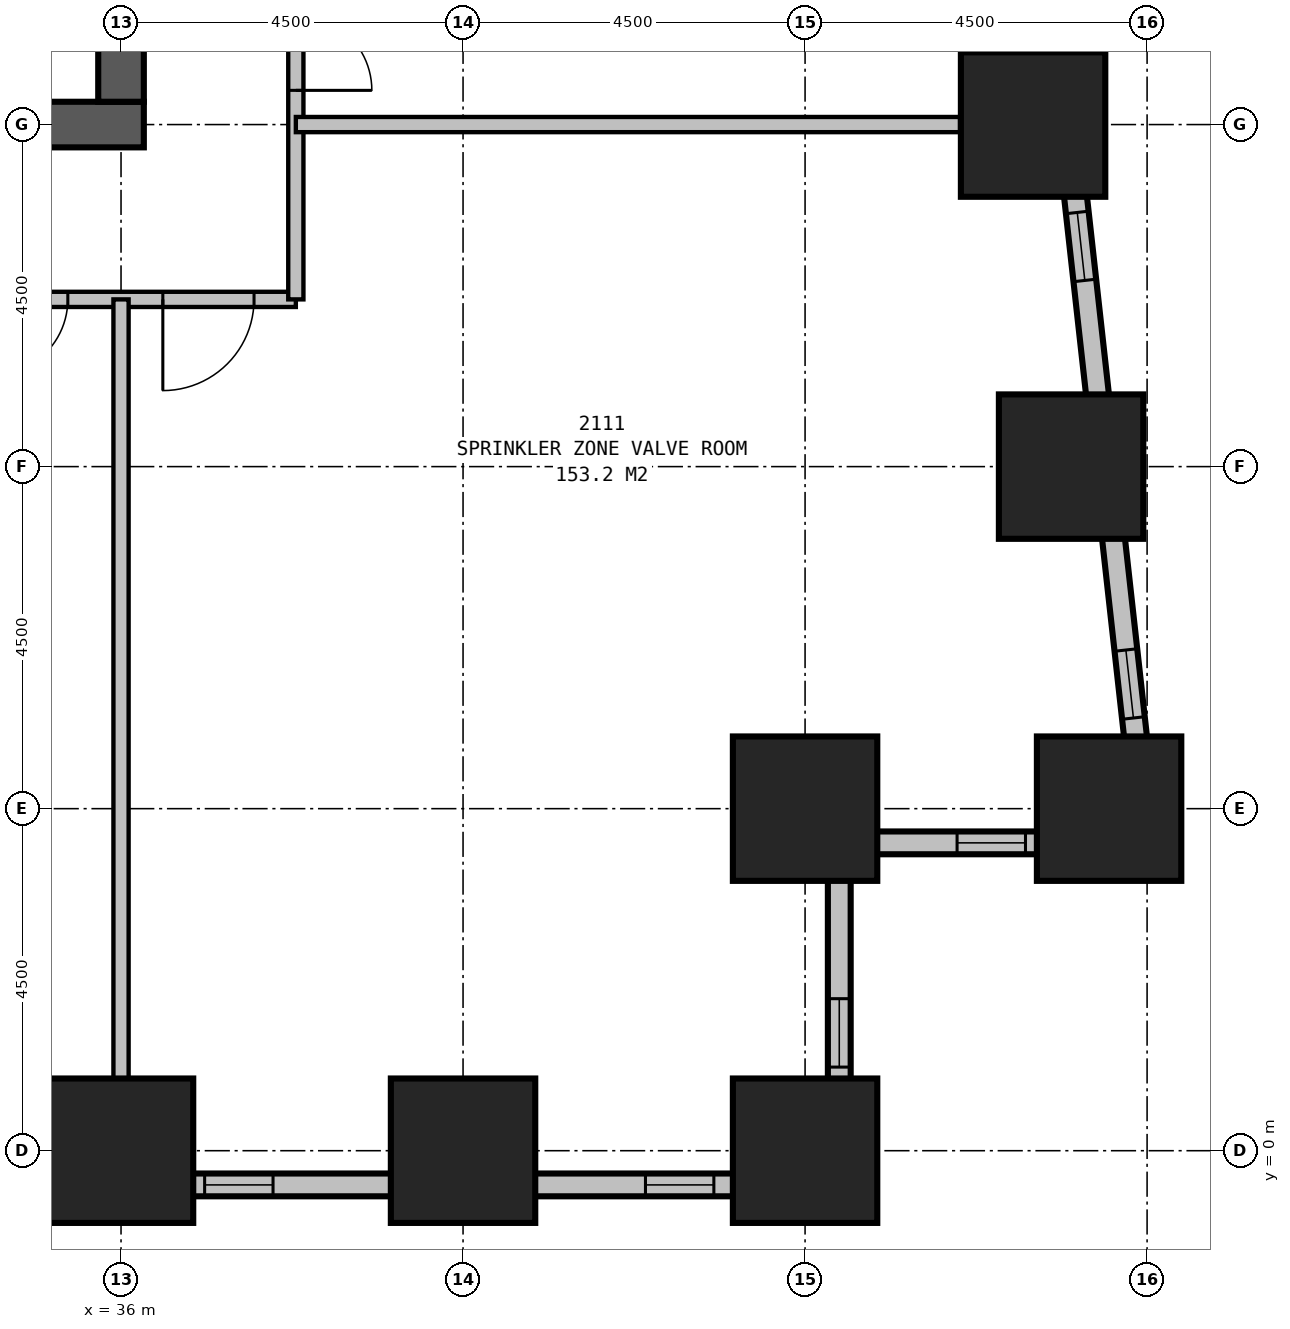
"""IFC4 building model, lengths in metres.
Left out: names, types, materials, properties, quantities, classifications, styles, units other than length and angle.
Written with IfcOpenShell. Run it as: python <this file> out.ifc"""

import sys

from ifc_helpers import new_model, si_unit, direction, frame, frame_2d, origin, origin_2d, place, context, subcontext, project, spatial, rectangle, extrude, element, fill, save


model = new_model("IFC4")
c1 = context("Model", 3, precision=1e-05, world=origin(), true_north=direction((0.0, 1.0)))
c2 = subcontext(c1, "Body", "Model", "MODEL_VIEW")
j1 = project(units=[si_unit("LENGTHUNIT", "METRE"), si_unit("PLANEANGLEUNIT", "RADIAN")], contexts=[c1])
p1 = place(None, origin())
s1 = spatial("IfcSite", under=j1, at=p1, CompositionType="ELEMENT")
p2 = place(p1, origin())
s2 = spatial("IfcBuilding", under=s1, at=p2, CompositionType="ELEMENT")
p3 = place(p2, frame((0.0, 0.0, 85.7)))
s3 = spatial("IfcBuildingStorey", under=s2, at=p3, CompositionType="ELEMENT", Elevation=85.7)
for number, where, z_axis, x_axis in (
    (1, (36.0, 0.0, 0.0), (0.0, 0.0, 1.0), (1.0, 0.0, 0.0)),
    (2, (40.5, 0.0, 0.0), (0.0, 0.0, 1.0), (1.0, 0.0, 0.0)),
    (3, (45.0, 0.0, 0.0), (0.0, 0.0, 1.0), (1.0, 0.0, 0.0)),
    (4, (45.0, 4.5, 0.0), (0.0, 0.0, 1.0), (1.0, 0.0, 0.0)),
    (5, (49.0, 4.5, 0.0), (0.0, 0.0, 1.0), (1.0, 0.0, 0.0)),
    (6, (48.5, 9.0, 0.0), (0.0, 0.0, 1.0), (1.0, 0.0, 0.0)),
    (7, (48.0, 13.5, 0.0), (0.0, 0.0, 1.0), (1.0, 0.0, 0.0)),
):
    element("IfcColumn", number, at=place(p3, frame(where, z_axis=z_axis, x_axis=x_axis)), inside=s3, PredefinedType="COLUMN", context=c2, shape_type="SweptSolid", body=[
        extrude(rectangle(XDim=1.9, YDim=1.9, at=origin_2d()), origin(), (0.0, 0.0, 1.0), 4.2),
    ])
p4 = place(p3, frame((13.2, 13.5, 0.0), z_axis=(0.0, 0.0, 1.0), x_axis=(1.0, 0.0, 0.0)))
e8 = element("IfcWall", 8, at=p4, inside=s3, PredefinedType="SHEAR", context=c2, shape_type="SweptSolid", body=[
    extrude(rectangle(XDim=23.1, YDim=0.6, at=frame_2d((11.55, 0.0))), origin(), (0.0, 0.0, 1.0), 4.2),
])
p5 = place(p3, frame((36.0, 13.8, 0.0), z_axis=(0.0, 0.0, 1.0), x_axis=(0.0, 1.0, 0.0)))
e9 = element("IfcWall", 9, at=p5, inside=s3, PredefinedType="SHEAR", context=c2, shape_type="SweptSolid", body=[
    extrude(rectangle(XDim=2.7, YDim=0.6, at=frame_2d((1.35, 0.0))), origin(), (0.0, 0.0, 1.0), 4.2),
])
p6 = place(p3, frame((3.9, -0.45, 0.0), z_axis=(0.0, 0.0, 1.0), x_axis=(1.0, 0.0, 0.0)))
e10 = element("IfcWall", 10, at=p6, inside=s3, PredefinedType="STANDARD", context=c2, shape_type="SweptSolid", body=[
    extrude(rectangle(XDim=41.7, YDim=0.3, at=frame_2d((20.85, 0.0))), origin(), (0.0, 0.0, 1.0), 2.85),
])
p7 = place(p6, frame((3.0, 0.0, 0.5)))
e11 = element("IfcOpeningElement", 11, at=p7, cuts=e10, PredefinedType="OPENING", context=c2, shape_type="SweptSolid", body=[
    extrude(rectangle(XDim=0.9, YDim=1.2, at=frame_2d((0.45, 0.6))), frame((0.0, 0.16, 0.0), z_axis=(0.0, -1.0, 0.0), x_axis=(1.0, 0.0, 0.0)), (0.0, 0.0, 1.0), 0.32),
])
p8 = place(p6, frame((6.2, 0.0, 0.5)))
e12 = element("IfcOpeningElement", 12, at=p8, cuts=e10, PredefinedType="OPENING", context=c2, shape_type="SweptSolid", body=[
    extrude(rectangle(XDim=0.9, YDim=1.2, at=frame_2d((0.45, 0.6))), frame((0.0, 0.16, 0.0), z_axis=(0.0, -1.0, 0.0), x_axis=(1.0, 0.0, 0.0)), (0.0, 0.0, 1.0), 0.32),
])
p9 = place(p6, frame((12.0, 0.0, 0.5)))
e13 = element("IfcOpeningElement", 13, at=p9, cuts=e10, PredefinedType="OPENING", context=c2, shape_type="SweptSolid", body=[
    extrude(rectangle(XDim=0.9, YDim=1.2, at=frame_2d((0.45, 0.6))), frame((0.0, 0.16, 0.0), z_axis=(0.0, -1.0, 0.0), x_axis=(1.0, 0.0, 0.0)), (0.0, 0.0, 1.0), 0.32),
])
p10 = place(p6, frame((15.2, 0.0, 0.5)))
e14 = element("IfcOpeningElement", 14, at=p10, cuts=e10, PredefinedType="OPENING", context=c2, shape_type="SweptSolid", body=[
    extrude(rectangle(XDim=0.9, YDim=1.2, at=frame_2d((0.45, 0.6))), frame((0.0, 0.16, 0.0), z_axis=(0.0, -1.0, 0.0), x_axis=(1.0, 0.0, 0.0)), (0.0, 0.0, 1.0), 0.32),
])
p11 = place(p6, frame((21.0, 0.0, 0.5)))
e15 = element("IfcOpeningElement", 15, at=p11, cuts=e10, PredefinedType="OPENING", context=c2, shape_type="SweptSolid", body=[
    extrude(rectangle(XDim=0.9, YDim=1.2, at=frame_2d((0.45, 0.6))), frame((0.0, 0.16, 0.0), z_axis=(0.0, -1.0, 0.0), x_axis=(1.0, 0.0, 0.0)), (0.0, 0.0, 1.0), 0.32),
])
p12 = place(p6, frame((24.2, 0.0, 0.5)))
e16 = element("IfcOpeningElement", 16, at=p12, cuts=e10, PredefinedType="OPENING", context=c2, shape_type="SweptSolid", body=[
    extrude(rectangle(XDim=0.9, YDim=1.2, at=frame_2d((0.45, 0.6))), frame((0.0, 0.16, 0.0), z_axis=(0.0, -1.0, 0.0), x_axis=(1.0, 0.0, 0.0)), (0.0, 0.0, 1.0), 0.32),
])
p13 = place(p6, frame((30.0, 0.0, 0.5)))
e17 = element("IfcOpeningElement", 17, at=p13, cuts=e10, PredefinedType="OPENING", context=c2, shape_type="SweptSolid", body=[
    extrude(rectangle(XDim=0.9, YDim=1.2, at=frame_2d((0.45, 0.6))), frame((0.0, 0.16, 0.0), z_axis=(0.0, -1.0, 0.0), x_axis=(1.0, 0.0, 0.0)), (0.0, 0.0, 1.0), 0.32),
])
p14 = place(p6, frame((33.2, 0.0, 0.5)))
e18 = element("IfcOpeningElement", 18, at=p14, cuts=e10, PredefinedType="OPENING", context=c2, shape_type="SweptSolid", body=[
    extrude(rectangle(XDim=0.9, YDim=1.2, at=frame_2d((0.45, 0.6))), frame((0.0, 0.16, 0.0), z_axis=(0.0, -1.0, 0.0), x_axis=(1.0, 0.0, 0.0)), (0.0, 0.0, 1.0), 0.32),
])
p15 = place(p6, frame((39.0, 0.0, 0.5)))
e19 = element("IfcOpeningElement", 19, at=p15, cuts=e10, PredefinedType="OPENING", context=c2, shape_type="SweptSolid", body=[
    extrude(rectangle(XDim=0.9, YDim=1.2, at=frame_2d((0.45, 0.6))), frame((0.0, 0.16, 0.0), z_axis=(0.0, -1.0, 0.0), x_axis=(1.0, 0.0, 0.0)), (0.0, 0.0, 1.0), 0.32),
])
p16 = place(p3, frame((45.45, -0.6, 0.0), z_axis=(0.0, 0.0, 1.0), x_axis=(0.0, 1.0, 0.0)))
e20 = element("IfcWall", 20, at=p16, inside=s3, PredefinedType="STANDARD", context=c2, shape_type="SweptSolid", body=[
    extrude(rectangle(XDim=4.8, YDim=0.3, at=frame_2d((2.4, 0.0))), origin(), (0.0, 0.0, 1.0), 2.85),
])
p17 = place(p16, frame((1.7, 0.0, 0.5)))
e21 = element("IfcOpeningElement", 21, at=p17, cuts=e20, PredefinedType="OPENING", context=c2, shape_type="SweptSolid", body=[
    extrude(rectangle(XDim=0.9, YDim=1.2, at=frame_2d((0.45, 0.6))), frame((0.0, 0.16, 0.0), z_axis=(0.0, -1.0, 0.0), x_axis=(1.0, 0.0, 0.0)), (0.0, 0.0, 1.0), 0.32),
])
p18 = place(p3, frame((45.3, 4.05, 0.0), z_axis=(0.0, 0.0, 1.0), x_axis=(1.0, 0.0, 0.0)))
e22 = element("IfcWall", 22, at=p18, inside=s3, PredefinedType="STANDARD", context=c2, shape_type="SweptSolid", body=[
    extrude(rectangle(XDim=4.353, YDim=0.3, at=frame_2d((2.176, 0.0))), origin(), (0.0, 0.0, 1.0), 2.85),
])
p19 = place(p18, frame((1.7, 0.0, 0.3)))
e23 = element("IfcOpeningElement", 23, at=p19, cuts=e22, PredefinedType="OPENING", context=c2, shape_type="SweptSolid", body=[
    extrude(rectangle(XDim=0.9, YDim=1.2, at=frame_2d((0.45, 0.6))), frame((0.0, 0.16, 0.0), z_axis=(0.0, -1.0, 0.0), x_axis=(1.0, 0.0, 0.0)), (0.0, 0.0, 1.0), 0.32),
])
p20 = place(p3, frame((49.519, 3.901, 0.0), z_axis=(0.0, 0.0, 1.0), x_axis=(-0.110429082637, 0.993884006164, 0.0)))
e24 = element("IfcWall", 24, at=p20, inside=s3, PredefinedType="STANDARD", context=c2, shape_type="SweptSolid", body=[
    extrude(rectangle(XDim=32.899, YDim=0.3, at=frame_2d((16.45, 0.0))), origin(), (0.0, 0.0, 1.0), 2.85),
])
p21 = place(p20, frame((1.803, 0.0, 0.5)))
e25 = element("IfcOpeningElement", 25, at=p21, cuts=e24, PredefinedType="OPENING", context=c2, shape_type="SweptSolid", body=[
    extrude(rectangle(XDim=0.9, YDim=1.2, at=frame_2d((0.45, 0.6))), frame((0.0, 0.16, 0.0), z_axis=(0.0, -1.0, 0.0), x_axis=(1.0, 0.0, 0.0)), (0.0, 0.0, 1.0), 0.32),
])
p22 = place(p20, frame((7.595, 0.0, 0.5)))
e26 = element("IfcOpeningElement", 26, at=p22, cuts=e24, PredefinedType="OPENING", context=c2, shape_type="SweptSolid", body=[
    extrude(rectangle(XDim=0.9, YDim=1.2, at=frame_2d((0.45, 0.6))), frame((0.0, 0.16, 0.0), z_axis=(0.0, -1.0, 0.0), x_axis=(1.0, 0.0, 0.0)), (0.0, 0.0, 1.0), 0.32),
])
p23 = place(p20, frame((10.858, 0.0, 0.5)))
e27 = element("IfcOpeningElement", 27, at=p23, cuts=e24, PredefinedType="OPENING", context=c2, shape_type="SweptSolid", body=[
    extrude(rectangle(XDim=0.9, YDim=1.2, at=frame_2d((0.45, 0.6))), frame((0.0, 0.16, 0.0), z_axis=(0.0, -1.0, 0.0), x_axis=(1.0, 0.0, 0.0)), (0.0, 0.0, 1.0), 0.32),
])
p24 = place(p20, frame((16.65, 0.0, 0.5)))
e28 = element("IfcOpeningElement", 28, at=p24, cuts=e24, PredefinedType="OPENING", context=c2, shape_type="SweptSolid", body=[
    extrude(rectangle(XDim=0.9, YDim=1.2, at=frame_2d((0.45, 0.6))), frame((0.0, 0.16, 0.0), z_axis=(0.0, -1.0, 0.0), x_axis=(1.0, 0.0, 0.0)), (0.0, 0.0, 1.0), 0.32),
])
p25 = place(p20, frame((19.914, 0.0, 0.5)))
e29 = element("IfcOpeningElement", 29, at=p25, cuts=e24, PredefinedType="OPENING", context=c2, shape_type="SweptSolid", body=[
    extrude(rectangle(XDim=0.9, YDim=1.2, at=frame_2d((0.45, 0.6))), frame((0.0, 0.16, 0.0), z_axis=(0.0, -1.0, 0.0), x_axis=(1.0, 0.0, 0.0)), (0.0, 0.0, 1.0), 0.32),
])
p26 = place(p20, frame((25.705, 0.0, 0.5)))
e30 = element("IfcOpeningElement", 30, at=p26, cuts=e24, PredefinedType="OPENING", context=c2, shape_type="SweptSolid", body=[
    extrude(rectangle(XDim=0.9, YDim=1.2, at=frame_2d((0.45, 0.6))), frame((0.0, 0.16, 0.0), z_axis=(0.0, -1.0, 0.0), x_axis=(1.0, 0.0, 0.0)), (0.0, 0.0, 1.0), 0.32),
])
p27 = place(p20, frame((28.969, 0.0, 0.5)))
e31 = element("IfcOpeningElement", 31, at=p27, cuts=e24, PredefinedType="OPENING", context=c2, shape_type="SweptSolid", body=[
    extrude(rectangle(XDim=0.9, YDim=1.2, at=frame_2d((0.45, 0.6))), frame((0.0, 0.16, 0.0), z_axis=(0.0, -1.0, 0.0), x_axis=(1.0, 0.0, 0.0)), (0.0, 0.0, 1.0), 0.32),
])
p28 = place(p3, frame((11.2, 11.2, 0.0), z_axis=(0.0, 0.0, 1.0), x_axis=(1.0, 0.0, 0.0)))
e32 = element("IfcWall", 32, at=p28, inside=s3, PredefinedType="PARTITIONING", context=c2, shape_type="SweptSolid", body=[
    extrude(rectangle(XDim=27.1, YDim=0.2, at=frame_2d((13.55, 0.0))), origin(), (0.0, 0.0, 1.0), 3.95),
])
p29 = place(p28, frame((4.55, 0.0, 0.0), z_axis=(0.0, 0.0, 1.0), x_axis=(-1.0, 0.0, 0.0)))
e33 = element("IfcOpeningElement", 33, at=p29, cuts=e32, PredefinedType="OPENING", context=c2, shape_type="SweptSolid", body=[
    extrude(rectangle(XDim=1.8, YDim=2.4, at=frame_2d((0.9, 1.2))), frame((0.0, 0.11, 0.0), z_axis=(0.0, -1.0, 0.0), x_axis=(1.0, 0.0, 0.0)), (0.0, 0.0, 1.0), 0.22),
])
p30 = place(p28, frame((22.0, 0.0, 0.0), z_axis=(0.0, 0.0, 1.0), x_axis=(-1.0, 0.0, 0.0)))
e34 = element("IfcOpeningElement", 34, at=p30, cuts=e32, PredefinedType="OPENING", context=c2, shape_type="SweptSolid", body=[
    extrude(rectangle(XDim=1.0, YDim=2.1, at=frame_2d((0.5, 1.05))), frame((0.0, 0.11, 0.0), z_axis=(0.0, -1.0, 0.0), x_axis=(1.0, 0.0, 0.0)), (0.0, 0.0, 1.0), 0.22),
])
p31 = place(p28, frame((24.1, 0.0, 0.0), z_axis=(0.0, 0.0, 1.0), x_axis=(-1.0, 0.0, 0.0)))
e35 = element("IfcOpeningElement", 35, at=p31, cuts=e32, PredefinedType="OPENING", context=c2, shape_type="SweptSolid", body=[
    extrude(rectangle(XDim=1.0, YDim=2.1, at=frame_2d((0.5, 1.05))), frame((0.0, 0.11, 0.0), z_axis=(0.0, -1.0, 0.0), x_axis=(1.0, 0.0, 0.0)), (0.0, 0.0, 1.0), 0.22),
])
p32 = place(p28, frame((1.75, 0.0, 0.0), z_axis=(0.0, 0.0, 1.0), x_axis=(-1.0, 0.0, 0.0)))
e36 = element("IfcOpeningElement", 36, at=p32, cuts=e32, PredefinedType="OPENING", context=c2, shape_type="SweptSolid", body=[
    extrude(rectangle(XDim=1.2, YDim=2.1, at=frame_2d((0.6, 1.05))), frame((0.0, 0.11, 0.0), z_axis=(0.0, -1.0, 0.0), x_axis=(1.0, 0.0, 0.0)), (0.0, 0.0, 1.0), 0.22),
])
p33 = place(p28, frame((26.55, 0.0, 0.0), z_axis=(0.0, 0.0, 1.0), x_axis=(-1.0, 0.0, 0.0)))
e37 = element("IfcOpeningElement", 37, at=p33, cuts=e32, PredefinedType="OPENING", context=c2, shape_type="SweptSolid", body=[
    extrude(rectangle(XDim=1.2, YDim=2.1, at=frame_2d((0.6, 1.05))), frame((0.0, 0.11, 0.0), z_axis=(0.0, -1.0, 0.0), x_axis=(1.0, 0.0, 0.0)), (0.0, 0.0, 1.0), 0.22),
])
p34 = place(p3, frame((38.3, 11.2, 0.0), z_axis=(0.0, 0.0, 1.0), x_axis=(0.0, 1.0, 0.0)))
e38 = element("IfcWall", 38, at=p34, inside=s3, PredefinedType="PARTITIONING", context=c2, shape_type="SweptSolid", body=[
    extrude(rectangle(XDim=18.1, YDim=0.2, at=frame_2d((9.05, 0.0))), origin(), (0.0, 0.0, 1.0), 3.95),
])
p35 = place(p34, frame((3.75, 0.0, 0.0), z_axis=(0.0, 0.0, 1.0), x_axis=(-1.0, 0.0, 0.0)))
e39 = element("IfcOpeningElement", 39, at=p35, cuts=e38, PredefinedType="OPENING", context=c2, shape_type="SweptSolid", body=[
    extrude(rectangle(XDim=1.0, YDim=2.1, at=frame_2d((0.5, 1.05))), frame((0.0, 0.11, 0.0), z_axis=(0.0, -1.0, 0.0), x_axis=(1.0, 0.0, 0.0)), (0.0, 0.0, 1.0), 0.22),
])
p36 = place(p34, frame((8.45, 0.0, 0.0), z_axis=(0.0, 0.0, 1.0), x_axis=(-1.0, 0.0, 0.0)))
e40 = element("IfcOpeningElement", 40, at=p36, cuts=e38, PredefinedType="OPENING", context=c2, shape_type="SweptSolid", body=[
    extrude(rectangle(XDim=1.2, YDim=2.1, at=frame_2d((0.6, 1.05))), frame((0.0, 0.11, 0.0), z_axis=(0.0, -1.0, 0.0), x_axis=(1.0, 0.0, 0.0)), (0.0, 0.0, 1.0), 0.22),
])
p37 = place(p3, frame((36.0, 11.2, 0.0), z_axis=(0.0, 0.0, 1.0), x_axis=(0.0, -1.0, 0.0)))
e41 = element("IfcWall", 41, at=p37, inside=s3, PredefinedType="PARTITIONING", context=c2, shape_type="SweptSolid", body=[
    extrude(rectangle(XDim=10.25, YDim=0.2, at=frame_2d((5.125, 0.0))), origin(), (0.0, 0.0, 1.0), 2.95),
])
p38 = place(p3, frame((38.3, 13.5, 0.0), z_axis=(0.0, 0.0, 1.0), x_axis=(1.0, 0.0, 0.0)))
e42 = element("IfcWall", 42, at=p38, inside=s3, PredefinedType="PARTITIONING", context=c2, shape_type="SweptSolid", body=[
    extrude(rectangle(XDim=8.739, YDim=0.2, at=frame_2d((4.37, 0.0))), origin(), (0.0, 0.0, 1.0), 2.65),
])
p39 = place(p14, origin())
e43 = element("IfcWindow", 43, at=p39, inside=s3, PartitioningType="SINGLE_PANEL", PredefinedType="USERDEFINED", context=c2, shape_type="SweptSolid", body=[
    extrude(rectangle(XDim=0.9, YDim=1.2, at=frame_2d((0.45, 0.6))), frame((0.0, 0.03, 0.0), z_axis=(0.0, -1.0, 0.0), x_axis=(1.0, 0.0, 0.0)), (0.0, 0.0, 1.0), 0.06),
])
fill(e18, e43)
p40 = place(p15, origin())
e44 = element("IfcWindow", 44, at=p40, inside=s3, PartitioningType="SINGLE_PANEL", PredefinedType="USERDEFINED", context=c2, shape_type="SweptSolid", body=[
    extrude(rectangle(XDim=0.9, YDim=1.2, at=frame_2d((0.45, 0.6))), frame((0.0, 0.03, 0.0), z_axis=(0.0, -1.0, 0.0), x_axis=(1.0, 0.0, 0.0)), (0.0, 0.0, 1.0), 0.06),
])
fill(e19, e44)
p41 = place(p17, origin())
e45 = element("IfcWindow", 45, at=p41, inside=s3, PartitioningType="SINGLE_PANEL", PredefinedType="USERDEFINED", context=c2, shape_type="SweptSolid", body=[
    extrude(rectangle(XDim=0.9, YDim=1.2, at=frame_2d((0.45, 0.6))), frame((0.0, 0.03, 0.0), z_axis=(0.0, -1.0, 0.0), x_axis=(1.0, 0.0, 0.0)), (0.0, 0.0, 1.0), 0.06),
])
fill(e21, e45)
p42 = place(p19, origin())
e46 = element("IfcWindow", 46, at=p42, inside=s3, PartitioningType="SINGLE_PANEL", PredefinedType="USERDEFINED", context=c2, shape_type="SweptSolid", body=[
    extrude(rectangle(XDim=0.9, YDim=1.2, at=frame_2d((0.45, 0.6))), frame((0.0, 0.03, 0.0), z_axis=(0.0, -1.0, 0.0), x_axis=(1.0, 0.0, 0.0)), (0.0, 0.0, 1.0), 0.06),
])
fill(e23, e46)
p43 = place(p21, origin())
e47 = element("IfcWindow", 47, at=p43, inside=s3, PartitioningType="SINGLE_PANEL", PredefinedType="USERDEFINED", context=c2, shape_type="SweptSolid", body=[
    extrude(rectangle(XDim=0.9, YDim=1.2, at=frame_2d((0.45, 0.6))), frame((0.0, 0.03, 0.0), z_axis=(0.0, -1.0, 0.0), x_axis=(1.0, 0.0, 0.0)), (0.0, 0.0, 1.0), 0.06),
])
fill(e25, e47)
p44 = place(p22, origin())
e48 = element("IfcWindow", 48, at=p44, inside=s3, PartitioningType="SINGLE_PANEL", PredefinedType="USERDEFINED", context=c2, shape_type="SweptSolid", body=[
    extrude(rectangle(XDim=0.9, YDim=1.2, at=frame_2d((0.45, 0.6))), frame((0.0, 0.03, 0.0), z_axis=(0.0, -1.0, 0.0), x_axis=(1.0, 0.0, 0.0)), (0.0, 0.0, 1.0), 0.06),
])
fill(e26, e48)
p45 = place(p31, origin())
e49 = element("IfcDoor", 49, at=p45, inside=s3, OperationType="SINGLE_SWING_RIGHT", PredefinedType="DOOR", context=c2, shape_type="SweptSolid", body=[
    extrude(rectangle(XDim=1.0, YDim=2.1, at=frame_2d((0.5, 1.05))), frame((0.0, 0.025, 0.0), z_axis=(0.0, -1.0, 0.0), x_axis=(1.0, 0.0, 0.0)), (0.0, 0.0, 1.0), 0.05),
])
fill(e35, e49)
p46 = place(p33, origin())
e50 = element("IfcDoor", 50, at=p46, inside=s3, OperationType="SINGLE_SWING_RIGHT", PredefinedType="DOOR", context=c2, shape_type="SweptSolid", body=[
    extrude(rectangle(XDim=1.2, YDim=2.1, at=frame_2d((0.6, 1.05))), frame((0.0, 0.025, 0.0), z_axis=(0.0, -1.0, 0.0), x_axis=(1.0, 0.0, 0.0)), (0.0, 0.0, 1.0), 0.05),
])
fill(e37, e50)
p47 = place(p35, origin())
e51 = element("IfcDoor", 51, at=p47, inside=s3, OperationType="SINGLE_SWING_RIGHT", PredefinedType="DOOR", context=c2, shape_type="SweptSolid", body=[
    extrude(rectangle(XDim=1.0, YDim=2.1, at=frame_2d((0.5, 1.05))), frame((0.0, 0.025, 0.0), z_axis=(0.0, -1.0, 0.0), x_axis=(1.0, 0.0, 0.0)), (0.0, 0.0, 1.0), 0.05),
])
fill(e39, e51)
save(model, sys.argv[1])
